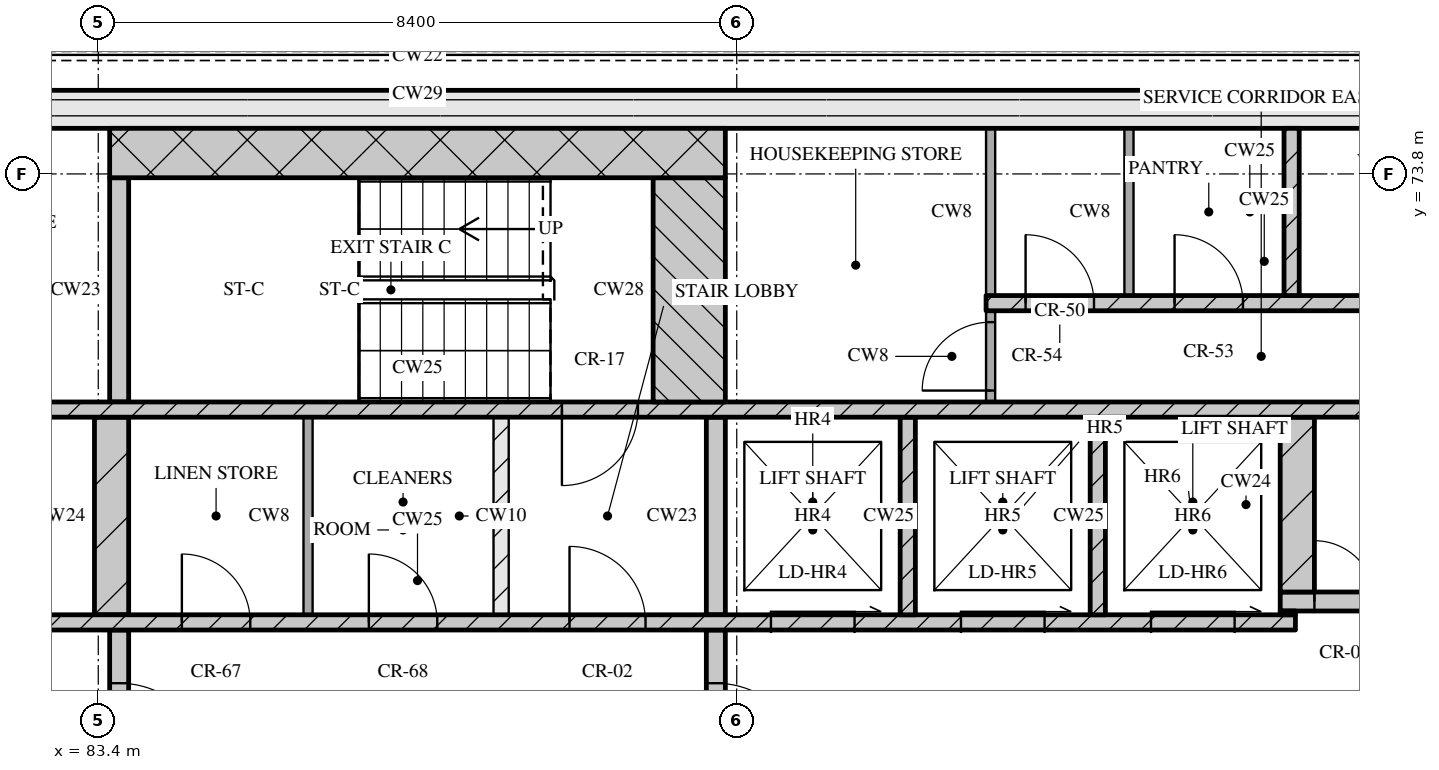
"""IFC4 building model, lengths in metres.
Left out: names, types, materials, properties, quantities, classifications, styles, units other than length and angle.
Written with IfcOpenShell. Run it as: python <this file> out.ifc"""

import sys

from ifc_helpers import new_model, si_unit, direction, frame, frame_2d, origin, place, context, subcontext, project, spatial, rectangle, extrude, element, fill, save


model = new_model("IFC4")
c1 = context("Model", 3, precision=1e-05, world=origin(), true_north=direction((0.0, 1.0)))
c2 = subcontext(c1, "Body", "Model", "MODEL_VIEW")
j1 = project(units=[si_unit("LENGTHUNIT", "METRE"), si_unit("PLANEANGLEUNIT", "RADIAN")], contexts=[c1])
p1 = place(None, origin())
s1 = spatial("IfcSite", under=j1, at=p1, CompositionType="ELEMENT")
p2 = place(p1, origin())
s2 = spatial("IfcBuilding", under=s1, at=p2, CompositionType="ELEMENT")
p3 = place(p2, frame((0.0, 0.0, 274.35)))
s3 = spatial("IfcBuildingStorey", under=s2, at=p3, CompositionType="ELEMENT", Elevation=274.35)
p4 = place(p3, frame((67.3, 74.65, 0.0), z_axis=(0.0, 0.0, 1.0), x_axis=(1.0, 0.0, 0.0)))
e1 = element("IfcWall", 1, at=p4, inside=s3, PredefinedType="SOLIDWALL", context=c2, shape_type="SweptSolid", body=[
    extrude(rectangle(XDim=40.6, YDim=0.5, at=frame_2d((20.3, 0.0))), origin(), (0.0, 0.0, 1.0), 3.32),
])
p5 = place(p3, frame((83.675, 65.2, 0.0), z_axis=(0.0, 0.0, 1.0), x_axis=(0.0, 1.0, 0.0)))
e2 = element("IfcWall", 2, at=p5, inside=s3, PredefinedType="SOLIDWALL", context=c2, shape_type="SweptSolid", body=[
    extrude(rectangle(XDim=2.6, YDim=0.25, at=frame_2d((1.3, 0.0))), origin(), (0.0, 0.0, 1.0), 3.32),
])
p6 = place(p5, frame((0.7, 0.0, 0.0)))
e3 = element("IfcOpeningElement", 3, at=p6, cuts=e2, PredefinedType="OPENING", context=c2, shape_type="SweptSolid", body=[
    extrude(rectangle(XDim=1.2, YDim=2.1, at=frame_2d((0.6, 1.05))), frame((0.0, 0.135, 0.0), z_axis=(0.0, -1.0, 0.0), x_axis=(1.0, 0.0, 0.0)), (0.0, 0.0, 1.0), 0.27),
])
p7 = place(p3, frame((91.525, 65.2, 0.0), z_axis=(0.0, 0.0, 1.0), x_axis=(0.0, 1.0, 0.0)))
e4 = element("IfcWall", 4, at=p7, inside=s3, PredefinedType="SOLIDWALL", context=c2, shape_type="SweptSolid", body=[
    extrude(rectangle(XDim=2.6, YDim=0.25, at=frame_2d((1.3, 0.0))), origin(), (0.0, 0.0, 1.0), 3.32),
])
p8 = place(p7, frame((0.7, 0.0, 0.0)))
e5 = element("IfcOpeningElement", 5, at=p8, cuts=e4, PredefinedType="OPENING", context=c2, shape_type="SweptSolid", body=[
    extrude(rectangle(XDim=1.2, YDim=2.1, at=frame_2d((0.6, 1.05))), frame((0.0, 0.135, 0.0), z_axis=(0.0, -1.0, 0.0), x_axis=(1.0, 0.0, 0.0)), (0.0, 0.0, 1.0), 0.27),
])
p9 = place(p3, frame((76.05, 67.9, 0.0), z_axis=(0.0, 0.0, 1.0), x_axis=(1.0, 0.0, 0.0)))
e6 = element("IfcWall", 6, at=p9, inside=s3, PredefinedType="SOLIDWALL", context=c2, shape_type="SweptSolid", body=[
    extrude(rectangle(XDim=23.1, YDim=0.2, at=frame_2d((11.55, 0.0))), origin(), (0.0, 0.0, 1.0), 3.32),
])
p10 = place(p9, frame((1.35, 0.0, 0.0)))
e7 = element("IfcOpeningElement", 7, at=p10, cuts=e6, PredefinedType="OPENING", context=c2, shape_type="SweptSolid", body=[
    extrude(rectangle(XDim=0.9, YDim=2.1, at=frame_2d((0.45, 1.05))), frame((0.0, 0.11, 0.0), z_axis=(0.0, -1.0, 0.0), x_axis=(1.0, 0.0, 0.0)), (0.0, 0.0, 1.0), 0.22),
])
p11 = place(p9, frame((5.06, 0.0, 0.0)))
e8 = element("IfcOpeningElement", 8, at=p11, cuts=e6, PredefinedType="OPENING", context=c2, shape_type="SweptSolid", body=[
    extrude(rectangle(XDim=0.9, YDim=2.1, at=frame_2d((0.45, 1.05))), frame((0.0, 0.11, 0.0), z_axis=(0.0, -1.0, 0.0), x_axis=(1.0, 0.0, 0.0)), (0.0, 0.0, 1.0), 0.22),
])
p12 = place(p9, frame((8.45, 0.0, 0.0)))
e9 = element("IfcOpeningElement", 9, at=p12, cuts=e6, PredefinedType="OPENING", context=c2, shape_type="SweptSolid", body=[
    extrude(rectangle(XDim=0.9, YDim=2.1, at=frame_2d((0.45, 1.05))), frame((0.0, 0.11, 0.0), z_axis=(0.0, -1.0, 0.0), x_axis=(1.0, 0.0, 0.0)), (0.0, 0.0, 1.0), 0.22),
])
p13 = place(p9, frame((10.91, 0.0, 0.0)))
e10 = element("IfcOpeningElement", 10, at=p13, cuts=e6, PredefinedType="OPENING", context=c2, shape_type="SweptSolid", body=[
    extrude(rectangle(XDim=0.9, YDim=2.1, at=frame_2d((0.45, 1.05))), frame((0.0, 0.11, 0.0), z_axis=(0.0, -1.0, 0.0), x_axis=(1.0, 0.0, 0.0)), (0.0, 0.0, 1.0), 0.22),
])
p14 = place(p9, frame((13.55, 0.0, 0.0)))
e11 = element("IfcOpeningElement", 11, at=p14, cuts=e6, PredefinedType="OPENING", context=c2, shape_type="SweptSolid", body=[
    extrude(rectangle(XDim=1.0, YDim=2.1, at=frame_2d((0.5, 1.05))), frame((0.0, 0.11, 0.0), z_axis=(0.0, -1.0, 0.0), x_axis=(1.0, 0.0, 0.0)), (0.0, 0.0, 1.0), 0.22),
])
p15 = place(p9, frame((16.2, 0.0, 0.0)))
e12 = element("IfcOpeningElement", 12, at=p15, cuts=e6, PredefinedType="OPENING", context=c2, shape_type="SweptSolid", body=[
    extrude(rectangle(XDim=1.1, YDim=2.1, at=frame_2d((0.55, 1.05))), frame((0.0, 0.11, 0.0), z_axis=(0.0, -1.0, 0.0), x_axis=(1.0, 0.0, 0.0)), (0.0, 0.0, 1.0), 0.22),
])
p16 = place(p9, frame((18.7, 0.0, 0.0)))
e13 = element("IfcOpeningElement", 13, at=p16, cuts=e6, PredefinedType="OPENING", context=c2, shape_type="SweptSolid", body=[
    extrude(rectangle(XDim=1.1, YDim=2.1, at=frame_2d((0.55, 1.05))), frame((0.0, 0.11, 0.0), z_axis=(0.0, -1.0, 0.0), x_axis=(1.0, 0.0, 0.0)), (0.0, 0.0, 1.0), 0.22),
])
p17 = place(p9, frame((21.2, 0.0, 0.0)))
e14 = element("IfcOpeningElement", 14, at=p17, cuts=e6, PredefinedType="OPENING", context=c2, shape_type="SweptSolid", body=[
    extrude(rectangle(XDim=1.1, YDim=2.1, at=frame_2d((0.55, 1.05))), frame((0.0, 0.11, 0.0), z_axis=(0.0, -1.0, 0.0), x_axis=(1.0, 0.0, 0.0)), (0.0, 0.0, 1.0), 0.22),
])
p18 = place(p3, frame((83.575, 68.0, 0.0), z_axis=(0.0, 0.0, 1.0), x_axis=(0.0, 1.0, 0.0)))
e15 = element("IfcWall", 15, at=p18, inside=s3, PredefinedType="SOLIDWALL", context=c2, shape_type="SweptSolid", body=[
    extrude(rectangle(XDim=2.6, YDim=0.45, at=frame_2d((1.3, 0.0))), origin(), (0.0, 0.0, 1.0), 3.32),
])
p19 = place(p3, frame((86.16, 68.0, 0.0), z_axis=(0.0, 0.0, 1.0), x_axis=(0.0, 1.0, 0.0)))
e16 = element("IfcWall", 16, at=p19, inside=s3, PredefinedType="PARTITIONING", context=c2, shape_type="SweptSolid", body=[
    extrude(rectangle(XDim=2.6, YDim=0.12, at=frame_2d((1.3, 0.0))), origin(), (0.0, 0.0, 1.0), 3.32),
])
p20 = place(p3, frame((88.7, 68.0, 0.0), z_axis=(0.0, 0.0, 1.0), x_axis=(0.0, 1.0, 0.0)))
e17 = element("IfcWall", 17, at=p20, inside=s3, PredefinedType="PARTITIONING", context=c2, shape_type="SweptSolid", body=[
    extrude(rectangle(XDim=2.6, YDim=0.2, at=frame_2d((1.3, 0.0))), origin(), (0.0, 0.0, 1.0), 3.32),
])
p21 = place(p3, frame((91.525, 68.0, 0.0), z_axis=(0.0, 0.0, 1.0), x_axis=(0.0, 1.0, 0.0)))
e18 = element("IfcWall", 18, at=p21, inside=s3, PredefinedType="SOLIDWALL", context=c2, shape_type="SweptSolid", body=[
    extrude(rectangle(XDim=2.6, YDim=0.25, at=frame_2d((1.3, 0.0))), origin(), (0.0, 0.0, 1.0), 3.32),
])
for number, where, z_axis, x_axis in (
    (19, (94.05, 68.0, 0.0), (0.0, 0.0, 1.0), (0.0, 1.0, 0.0)),
    (20, (96.55, 68.0, 0.0), (0.0, 0.0, 1.0), (0.0, 1.0, 0.0)),
):
    element("IfcWall", number, at=place(p3, frame(where, z_axis=z_axis, x_axis=x_axis)), inside=s3, PredefinedType="SOLIDWALL", context=c2, shape_type="SweptSolid", body=[
        extrude(rectangle(XDim=2.6, YDim=0.2, at=frame_2d((1.3, 0.0))), origin(), (0.0, 0.0, 1.0), 3.32),
    ])
p22 = place(p3, frame((98.95, 68.025, 0.0), z_axis=(0.0, 0.0, 1.0), x_axis=(1.0, 0.0, 0.0)))
e21 = element("IfcWall", 21, at=p22, inside=s3, PredefinedType="SOLIDWALL", context=c2, shape_type="SweptSolid", body=[
    extrude(rectangle(XDim=0.2, YDim=0.05, at=frame_2d((0.1, 0.0))), origin(), (0.0, 0.0, 1.0), 3.32),
])
p23 = place(p3, frame((98.95, 68.175, 0.0), z_axis=(0.0, 0.0, 1.0), x_axis=(1.0, 0.0, 0.0)))
e22 = element("IfcWall", 22, at=p23, inside=s3, PredefinedType="SOLIDWALL", context=c2, shape_type="SweptSolid", body=[
    extrude(rectangle(XDim=8.45, YDim=0.25, at=frame_2d((4.225, 0.0))), origin(), (0.0, 0.0, 1.0), 3.32),
])
p24 = place(p23, frame((0.45, 0.0, 0.0)))
e23 = element("IfcOpeningElement", 23, at=p24, cuts=e22, PredefinedType="OPENING", context=c2, shape_type="SweptSolid", body=[
    extrude(rectangle(XDim=0.8, YDim=2.1, at=frame_2d((0.4, 1.05))), frame((0.0, 0.135, 0.0), z_axis=(0.0, -1.0, 0.0), x_axis=(1.0, 0.0, 0.0)), (0.0, 0.0, 1.0), 0.27),
])
p25 = place(p23, frame((1.75, 0.0, 0.0)))
e24 = element("IfcOpeningElement", 24, at=p25, cuts=e22, PredefinedType="OPENING", context=c2, shape_type="SweptSolid", body=[
    extrude(rectangle(XDim=1.0, YDim=2.1, at=frame_2d((0.5, 1.05))), frame((0.0, 0.135, 0.0), z_axis=(0.0, -1.0, 0.0), x_axis=(1.0, 0.0, 0.0)), (0.0, 0.0, 1.0), 0.27),
])
p26 = place(p3, frame((99.175, 68.3, 0.0), z_axis=(0.0, 0.0, 1.0), x_axis=(0.0, 1.0, 0.0)))
e25 = element("IfcWall", 25, at=p26, inside=s3, PredefinedType="SOLIDWALL", context=c2, shape_type="SweptSolid", body=[
    extrude(rectangle(XDim=2.3, YDim=0.45, at=frame_2d((1.15, 0.0))), origin(), (0.0, 0.0, 1.0), 3.32),
])
p27 = place(p3, frame((67.8, 70.7, 0.0), z_axis=(0.0, 0.0, 1.0), x_axis=(1.0, 0.0, 0.0)))
e26 = element("IfcWall", 26, at=p27, inside=s3, PredefinedType="SOLIDWALL", context=c2, shape_type="SweptSolid", body=[
    extrude(rectangle(XDim=39.6, YDim=0.2, at=frame_2d((19.8, 0.0))), origin(), (0.0, 0.0, 1.0), 3.32),
])
p28 = place(p27, frame((0.65, 0.0, 0.0)))
e27 = element("IfcOpeningElement", 27, at=p28, cuts=e26, PredefinedType="OPENING", context=c2, shape_type="SweptSolid", body=[
    extrude(rectangle(XDim=1.1, YDim=2.1, at=frame_2d((0.55, 1.05))), frame((0.0, 0.11, 0.0), z_axis=(0.0, -1.0, 0.0), x_axis=(1.0, 0.0, 0.0)), (0.0, 0.0, 1.0), 0.22),
])
p29 = place(p27, frame((3.25, 0.0, 0.0)))
e28 = element("IfcOpeningElement", 28, at=p29, cuts=e26, PredefinedType="OPENING", context=c2, shape_type="SweptSolid", body=[
    extrude(rectangle(XDim=1.1, YDim=2.1, at=frame_2d((0.55, 1.05))), frame((0.0, 0.11, 0.0), z_axis=(0.0, -1.0, 0.0), x_axis=(1.0, 0.0, 0.0)), (0.0, 0.0, 1.0), 0.22),
])
p30 = place(p27, frame((5.9, 0.0, 0.0)))
e29 = element("IfcOpeningElement", 29, at=p30, cuts=e26, PredefinedType="OPENING", context=c2, shape_type="SweptSolid", body=[
    extrude(rectangle(XDim=1.0, YDim=2.1, at=frame_2d((0.5, 1.05))), frame((0.0, 0.11, 0.0), z_axis=(0.0, -1.0, 0.0), x_axis=(1.0, 0.0, 0.0)), (0.0, 0.0, 1.0), 0.22),
])
p31 = place(p27, frame((21.7, 0.0, 0.0)))
e30 = element("IfcOpeningElement", 30, at=p31, cuts=e26, PredefinedType="OPENING", context=c2, shape_type="SweptSolid", body=[
    extrude(rectangle(XDim=1.0, YDim=2.1, at=frame_2d((0.5, 1.05))), frame((0.0, 0.11, 0.0), z_axis=(0.0, -1.0, 0.0), x_axis=(1.0, 0.0, 0.0)), (0.0, 0.0, 1.0), 0.22),
])
p32 = place(p27, frame((32.7, 0.0, 0.0)))
e31 = element("IfcOpeningElement", 31, at=p32, cuts=e26, PredefinedType="OPENING", context=c2, shape_type="SweptSolid", body=[
    extrude(rectangle(XDim=1.0, YDim=2.1, at=frame_2d((0.5, 1.05))), frame((0.0, 0.11, 0.0), z_axis=(0.0, -1.0, 0.0), x_axis=(1.0, 0.0, 0.0)), (0.0, 0.0, 1.0), 0.22),
])
p33 = place(p27, frame((35.25, 0.0, 0.0)))
e32 = element("IfcOpeningElement", 32, at=p33, cuts=e26, PredefinedType="OPENING", context=c2, shape_type="SweptSolid", body=[
    extrude(rectangle(XDim=1.1, YDim=2.1, at=frame_2d((0.55, 1.05))), frame((0.0, 0.11, 0.0), z_axis=(0.0, -1.0, 0.0), x_axis=(1.0, 0.0, 0.0)), (0.0, 0.0, 1.0), 0.22),
])
p34 = place(p27, frame((37.85, 0.0, 0.0)))
e33 = element("IfcOpeningElement", 33, at=p34, cuts=e26, PredefinedType="OPENING", context=c2, shape_type="SweptSolid", body=[
    extrude(rectangle(XDim=1.1, YDim=2.1, at=frame_2d((0.55, 1.05))), frame((0.0, 0.11, 0.0), z_axis=(0.0, -1.0, 0.0), x_axis=(1.0, 0.0, 0.0)), (0.0, 0.0, 1.0), 0.22),
])
p35 = place(p3, frame((83.675, 70.8, 0.0), z_axis=(0.0, 0.0, 1.0), x_axis=(0.0, 1.0, 0.0)))
e34 = element("IfcWall", 34, at=p35, inside=s3, PredefinedType="SOLIDWALL", context=c2, shape_type="SweptSolid", body=[
    extrude(rectangle(XDim=2.95, YDim=0.25, at=frame_2d((1.475, 0.0))), origin(), (0.0, 0.0, 1.0), 3.32),
])
p36 = place(p3, frame((91.175, 70.8, 0.0), z_axis=(0.0, 0.0, 1.0), x_axis=(0.0, 1.0, 0.0)))
e35 = element("IfcWall", 35, at=p36, inside=s3, PredefinedType="SOLIDWALL", context=c2, shape_type="SweptSolid", body=[
    extrude(rectangle(XDim=2.95, YDim=0.95, at=frame_2d((1.475, 0.0))), origin(), (0.0, 0.0, 1.0), 3.32),
])
p37 = place(p3, frame((95.14, 70.8, 0.0), z_axis=(0.0, 0.0, 1.0), x_axis=(0.0, 1.0, 0.0)))
e36 = element("IfcWall", 36, at=p37, inside=s3, PredefinedType="PARTITIONING", context=c2, shape_type="SweptSolid", body=[
    extrude(rectangle(XDim=1.2, YDim=0.12, at=frame_2d((0.6, 0.0))), origin(), (0.0, 0.0, 1.0), 3.32),
])
p38 = place(p37, frame((0.15, 0.0, 0.0)))
e37 = element("IfcOpeningElement", 37, at=p38, cuts=e36, PredefinedType="OPENING", context=c2, shape_type="SweptSolid", body=[
    extrude(rectangle(XDim=0.9, YDim=2.1, at=frame_2d((0.45, 1.05))), frame((0.0, 0.07, 0.0), z_axis=(0.0, -1.0, 0.0), x_axis=(1.0, 0.0, 0.0)), (0.0, 0.0, 1.0), 0.14),
])
p39 = place(p3, frame((95.08, 72.1, 0.0), z_axis=(0.0, 0.0, 1.0), x_axis=(1.0, 0.0, 0.0)))
e38 = element("IfcWall", 38, at=p39, inside=s3, PredefinedType="SOLIDWALL", context=c2, shape_type="SweptSolid", body=[
    extrude(rectangle(XDim=7.32, YDim=0.2, at=frame_2d((3.66, 0.0))), origin(), (0.0, 0.0, 1.0), 3.32),
])
p40 = place(p39, frame((0.52, 0.0, 0.0)))
e39 = element("IfcOpeningElement", 39, at=p40, cuts=e38, PredefinedType="OPENING", context=c2, shape_type="SweptSolid", body=[
    extrude(rectangle(XDim=0.9, YDim=2.1, at=frame_2d((0.45, 1.05))), frame((0.0, 0.11, 0.0), z_axis=(0.0, -1.0, 0.0), x_axis=(1.0, 0.0, 0.0)), (0.0, 0.0, 1.0), 0.22),
])
p41 = place(p39, frame((2.48, 0.0, 0.0)))
e40 = element("IfcOpeningElement", 40, at=p41, cuts=e38, PredefinedType="OPENING", context=c2, shape_type="SweptSolid", body=[
    extrude(rectangle(XDim=0.9, YDim=2.1, at=frame_2d((0.45, 1.05))), frame((0.0, 0.11, 0.0), z_axis=(0.0, -1.0, 0.0), x_axis=(1.0, 0.0, 0.0)), (0.0, 0.0, 1.0), 0.22),
])
p42 = place(p39, frame((5.17, 0.0, 0.0)))
e41 = element("IfcOpeningElement", 41, at=p42, cuts=e38, PredefinedType="OPENING", context=c2, shape_type="SweptSolid", body=[
    extrude(rectangle(XDim=0.9, YDim=2.1, at=frame_2d((0.45, 1.05))), frame((0.0, 0.11, 0.0), z_axis=(0.0, -1.0, 0.0), x_axis=(1.0, 0.0, 0.0)), (0.0, 0.0, 1.0), 0.22),
])
for number, where, z_axis, x_axis in (
    (42, (95.14, 72.2, 0.0), (0.0, 0.0, 1.0), (0.0, 1.0, 0.0)),
    (43, (96.96, 72.2, 0.0), (0.0, 0.0, 1.0), (0.0, 1.0, 0.0)),
):
    element("IfcWall", number, at=place(p3, frame(where, z_axis=z_axis, x_axis=x_axis)), inside=s3, PredefinedType="PARTITIONING", context=c2, shape_type="SweptSolid", body=[
        extrude(rectangle(XDim=2.2, YDim=0.12, at=frame_2d((1.1, 0.0))), origin(), (0.0, 0.0, 1.0), 3.32),
    ])
p43 = place(p3, frame((99.1, 72.2, 0.0), z_axis=(0.0, 0.0, 1.0), x_axis=(0.0, 1.0, 0.0)))
e44 = element("IfcWall", 44, at=p43, inside=s3, PredefinedType="SOLIDWALL", context=c2, shape_type="SweptSolid", body=[
    extrude(rectangle(XDim=2.2, YDim=0.2, at=frame_2d((1.1, 0.0))), origin(), (0.0, 0.0, 1.0), 3.32),
])
p44 = place(p3, frame((83.55, 74.075, 0.0), z_axis=(0.0, 0.0, 1.0), x_axis=(1.0, 0.0, 0.0)))
e45 = element("IfcWall", 45, at=p44, inside=s3, PredefinedType="SOLIDWALL", context=c2, shape_type="SweptSolid", body=[
    extrude(rectangle(XDim=8.1, YDim=0.65, at=frame_2d((4.05, 0.0))), origin(), (0.0, 0.0, 1.0), 3.32),
])
p45 = place(p6, origin())
e46 = element("IfcDoor", 46, at=p45, inside=s3, OperationType="SINGLE_SWING_RIGHT", PredefinedType="DOOR", context=c2, shape_type="SweptSolid", body=[
    extrude(rectangle(XDim=1.2, YDim=2.1, at=frame_2d((0.6, 1.05))), frame((0.0, 0.025, 0.0), z_axis=(0.0, -1.0, 0.0), x_axis=(1.0, 0.0, 0.0)), (0.0, 0.0, 1.0), 0.05),
])
fill(e3, e46)
p46 = place(p8, origin())
e47 = element("IfcDoor", 47, at=p46, inside=s3, OperationType="SINGLE_SWING_RIGHT", PredefinedType="DOOR", context=c2, shape_type="SweptSolid", body=[
    extrude(rectangle(XDim=1.2, YDim=2.1, at=frame_2d((0.6, 1.05))), frame((0.0, 0.025, 0.0), z_axis=(0.0, -1.0, 0.0), x_axis=(1.0, 0.0, 0.0)), (0.0, 0.0, 1.0), 0.05),
])
fill(e5, e47)
p47 = place(p12, origin())
e48 = element("IfcDoor", 48, at=p47, inside=s3, OperationType="SINGLE_SWING_LEFT", PredefinedType="DOOR", context=c2, shape_type="SweptSolid", body=[
    extrude(rectangle(XDim=0.9, YDim=2.1, at=frame_2d((0.45, 1.05))), frame((0.0, 0.025, 0.0), z_axis=(0.0, -1.0, 0.0), x_axis=(1.0, 0.0, 0.0)), (0.0, 0.0, 1.0), 0.05),
])
fill(e9, e48)
p48 = place(p13, origin())
e49 = element("IfcDoor", 49, at=p48, inside=s3, OperationType="SINGLE_SWING_LEFT", PredefinedType="DOOR", context=c2, shape_type="SweptSolid", body=[
    extrude(rectangle(XDim=0.9, YDim=2.1, at=frame_2d((0.45, 1.05))), frame((0.0, 0.025, 0.0), z_axis=(0.0, -1.0, 0.0), x_axis=(1.0, 0.0, 0.0)), (0.0, 0.0, 1.0), 0.05),
])
fill(e10, e49)
p49 = place(p14, origin())
e50 = element("IfcDoor", 50, at=p49, inside=s3, OperationType="SINGLE_SWING_LEFT", PredefinedType="DOOR", context=c2, shape_type="SweptSolid", body=[
    extrude(rectangle(XDim=1.0, YDim=2.1, at=frame_2d((0.5, 1.05))), frame((0.0, 0.025, 0.0), z_axis=(0.0, -1.0, 0.0), x_axis=(1.0, 0.0, 0.0)), (0.0, 0.0, 1.0), 0.05),
])
fill(e11, e50)
p50 = place(p15, origin())
e51 = element("IfcDoor", 51, at=p50, inside=s3, OperationType="SLIDING_TO_RIGHT", PredefinedType="DOOR", context=c2, shape_type="SweptSolid", body=[
    extrude(rectangle(XDim=1.1, YDim=2.1, at=frame_2d((0.55, 1.05))), frame((0.0, 0.025, 0.0), z_axis=(0.0, -1.0, 0.0), x_axis=(1.0, 0.0, 0.0)), (0.0, 0.0, 1.0), 0.05),
])
fill(e12, e51)
p51 = place(p16, origin())
e52 = element("IfcDoor", 52, at=p51, inside=s3, OperationType="SLIDING_TO_RIGHT", PredefinedType="DOOR", context=c2, shape_type="SweptSolid", body=[
    extrude(rectangle(XDim=1.1, YDim=2.1, at=frame_2d((0.55, 1.05))), frame((0.0, 0.025, 0.0), z_axis=(0.0, -1.0, 0.0), x_axis=(1.0, 0.0, 0.0)), (0.0, 0.0, 1.0), 0.05),
])
fill(e13, e52)
p52 = place(p17, origin())
e53 = element("IfcDoor", 53, at=p52, inside=s3, OperationType="SLIDING_TO_RIGHT", PredefinedType="DOOR", context=c2, shape_type="SweptSolid", body=[
    extrude(rectangle(XDim=1.1, YDim=2.1, at=frame_2d((0.55, 1.05))), frame((0.0, 0.025, 0.0), z_axis=(0.0, -1.0, 0.0), x_axis=(1.0, 0.0, 0.0)), (0.0, 0.0, 1.0), 0.05),
])
fill(e14, e53)
p53 = place(p24, origin())
e54 = element("IfcDoor", 54, at=p53, inside=s3, OperationType="SINGLE_SWING_LEFT", PredefinedType="DOOR", context=c2, shape_type="SweptSolid", body=[
    extrude(rectangle(XDim=0.8, YDim=2.1, at=frame_2d((0.4, 1.05))), frame((0.0, 0.025, 0.0), z_axis=(0.0, -1.0, 0.0), x_axis=(1.0, 0.0, 0.0)), (0.0, 0.0, 1.0), 0.05),
])
fill(e23, e54)
p54 = place(p31, origin())
e55 = element("IfcDoor", 55, at=p54, inside=s3, OperationType="SINGLE_SWING_RIGHT", PredefinedType="DOOR", context=c2, shape_type="SweptSolid", body=[
    extrude(rectangle(XDim=1.0, YDim=2.1, at=frame_2d((0.5, 1.05))), frame((0.0, 0.025, 0.0), z_axis=(0.0, -1.0, 0.0), x_axis=(1.0, 0.0, 0.0)), (0.0, 0.0, 1.0), 0.05),
])
fill(e30, e55)
p55 = place(p38, origin())
e56 = element("IfcDoor", 56, at=p55, inside=s3, OperationType="SINGLE_SWING_LEFT", PredefinedType="DOOR", context=c2, shape_type="SweptSolid", body=[
    extrude(rectangle(XDim=0.9, YDim=2.1, at=frame_2d((0.45, 1.05))), frame((0.0, 0.025, 0.0), z_axis=(0.0, -1.0, 0.0), x_axis=(1.0, 0.0, 0.0)), (0.0, 0.0, 1.0), 0.05),
])
fill(e37, e56)
p56 = place(p40, origin())
e57 = element("IfcDoor", 57, at=p56, inside=s3, OperationType="SINGLE_SWING_LEFT", PredefinedType="DOOR", context=c2, shape_type="SweptSolid", body=[
    extrude(rectangle(XDim=0.9, YDim=2.1, at=frame_2d((0.45, 1.05))), frame((0.0, 0.025, 0.0), z_axis=(0.0, -1.0, 0.0), x_axis=(1.0, 0.0, 0.0)), (0.0, 0.0, 1.0), 0.05),
])
fill(e39, e57)
p57 = place(p41, origin())
e58 = element("IfcDoor", 58, at=p57, inside=s3, OperationType="SINGLE_SWING_LEFT", PredefinedType="DOOR", context=c2, shape_type="SweptSolid", body=[
    extrude(rectangle(XDim=0.9, YDim=2.1, at=frame_2d((0.45, 1.05))), frame((0.0, 0.025, 0.0), z_axis=(0.0, -1.0, 0.0), x_axis=(1.0, 0.0, 0.0)), (0.0, 0.0, 1.0), 0.05),
])
fill(e40, e58)
save(model, sys.argv[1])
